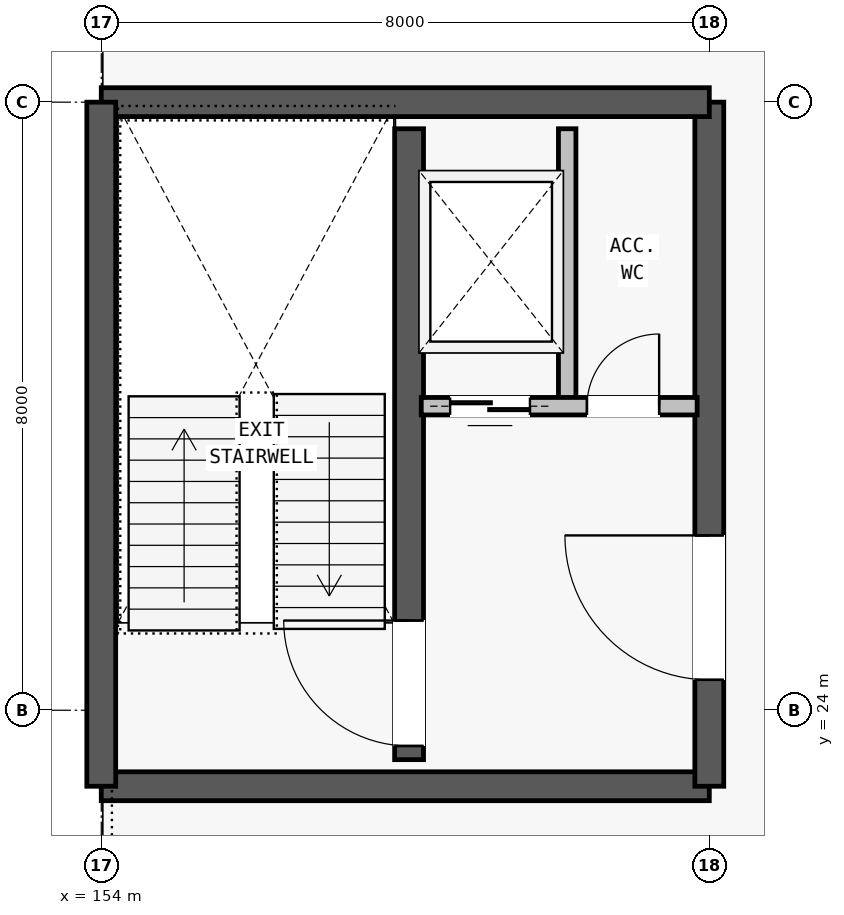
"""IFC4 building model, lengths in metres.
Left out: names, types, materials, properties, quantities, classifications, styles, units other than length and angle.
Written with IfcOpenShell. Run it as: python <this file> out.ifc"""

import sys

from ifc_helpers import new_model, si_unit, direction, frame, frame_2d, origin, place, context, subcontext, project, spatial, rectangle, extrude, element, fill, save


model = new_model("IFC4")
c1 = context("Model", 3, precision=1e-05, world=origin(), true_north=direction((0.0, 1.0)))
c2 = subcontext(c1, "Body", "Model", "MODEL_VIEW")
j1 = project(units=[si_unit("LENGTHUNIT", "METRE"), si_unit("PLANEANGLEUNIT", "RADIAN")], contexts=[c1])
p1 = place(None, origin())
s1 = spatial("IfcSite", under=j1, at=p1, CompositionType="ELEMENT")
p2 = place(p1, origin())
s2 = spatial("IfcBuilding", under=s1, at=p2, CompositionType="ELEMENT")
p3 = place(p2, frame((0.0, 0.0, 9.5)))
s3 = spatial("IfcBuildingStorey", under=s2, at=p3, CompositionType="ELEMENT", Elevation=9.5)
p4 = place(p3, frame((154.0, 23.0, 0.0), z_axis=(0.0, 0.0, 1.0), x_axis=(1.0, 0.0, 0.0)))
e1 = element("IfcWall", 1, at=p4, inside=s3, PredefinedType="SHEAR", context=c2, shape_type="SweptSolid", body=[
    extrude(rectangle(XDim=8.0, YDim=0.38, at=frame_2d((4.0, 0.0))), origin(), (0.0, 0.0, 1.0), 3.62),
])
p5 = place(p3, frame((162.0, 23.0, 0.0), z_axis=(0.0, 0.0, 1.0), x_axis=(0.0, 1.0, 0.0)))
e2 = element("IfcWall", 2, at=p5, inside=s3, PredefinedType="SHEAR", context=c2, shape_type="SweptSolid", body=[
    extrude(rectangle(XDim=9.0, YDim=0.38, at=frame_2d((4.5, 0.0))), origin(), (0.0, 0.0, 1.0), 3.62),
])
p6 = place(p5, frame((1.4, 0.0, 0.0)))
e3 = element("IfcOpeningElement", 3, at=p6, cuts=e2, PredefinedType="OPENING", context=c2, shape_type="SweptSolid", body=[
    extrude(rectangle(XDim=1.9, YDim=2.3, at=frame_2d((0.95, 1.15))), frame((0.0, 0.2, 0.0), z_axis=(0.0, -1.0, 0.0), x_axis=(1.0, 0.0, 0.0)), (0.0, 0.0, 1.0), 0.4),
])
p7 = place(p3, frame((162.0, 32.0, 0.0), z_axis=(0.0, 0.0, 1.0), x_axis=(-1.0, 0.0, 0.0)))
e4 = element("IfcWall", 4, at=p7, inside=s3, PredefinedType="SHEAR", context=c2, shape_type="SweptSolid", body=[
    extrude(rectangle(XDim=8.0, YDim=0.38, at=frame_2d((4.0, 0.0))), origin(), (0.0, 0.0, 1.0), 3.62),
])
p8 = place(p3, frame((154.0, 32.0, 0.0), z_axis=(0.0, 0.0, 1.0), x_axis=(0.0, -1.0, 0.0)))
e5 = element("IfcWall", 5, at=p8, inside=s3, PredefinedType="SHEAR", context=c2, shape_type="SweptSolid", body=[
    extrude(rectangle(XDim=9.0, YDim=0.38, at=frame_2d((4.5, 0.0))), origin(), (0.0, 0.0, 1.0), 3.62),
])
p9 = place(p3, frame((158.05, 23.35, 0.0), z_axis=(0.0, 0.0, 1.0), x_axis=(0.0, 1.0, 0.0)))
e6 = element("IfcWall", 6, at=p9, inside=s3, PredefinedType="SHEAR", context=c2, shape_type="SweptSolid", body=[
    extrude(rectangle(XDim=8.3, YDim=0.38, at=frame_2d((4.15, 0.0))), origin(), (0.0, 0.0, 1.0), 3.62),
])
p10 = place(p9, frame((0.18, 0.0, 0.0)))
e7 = element("IfcOpeningElement", 7, at=p10, cuts=e6, PredefinedType="OPENING", context=c2, shape_type="SweptSolid", body=[
    extrude(rectangle(XDim=1.65, YDim=2.2, at=frame_2d((0.825, 1.1))), frame((0.0, 0.2, 0.0), z_axis=(0.0, -1.0, 0.0), x_axis=(1.0, 0.0, 0.0)), (0.0, 0.0, 1.0), 0.4),
])
p11 = place(p3, frame((160.13, 28.0, 0.0), z_axis=(0.0, 0.0, 1.0), x_axis=(0.0, 1.0, 0.0)))
e8 = element("IfcWall", 8, at=p11, inside=s3, PredefinedType="PARTITIONING", context=c2, shape_type="SweptSolid", body=[
    extrude(rectangle(XDim=3.65, YDim=0.23, at=frame_2d((1.825, 0.0))), origin(), (0.0, 0.0, 1.0), 2.48),
])
p12 = place(p3, frame((158.21, 28.0, 0.0), z_axis=(0.0, 0.0, 1.0), x_axis=(1.0, 0.0, 0.0)))
e9 = element("IfcWall", 9, at=p12, inside=s3, PredefinedType="PARTITIONING", context=c2, shape_type="SweptSolid", body=[
    extrude(rectangle(XDim=3.63, YDim=0.23, at=frame_2d((1.815, 0.0))), origin(), (0.0, 0.0, 1.0), 2.48),
])
p13 = place(p12, frame((0.38, 0.0, 0.0)))
e10 = element("IfcOpeningElement", 10, at=p13, cuts=e9, PredefinedType="OPENING", context=c2, shape_type="SweptSolid", body=[
    extrude(rectangle(XDim=1.05, YDim=2.15, at=frame_2d((0.525, 1.075))), frame((0.0, 0.125, 0.0), z_axis=(0.0, -1.0, 0.0), x_axis=(1.0, 0.0, 0.0)), (0.0, 0.0, 1.0), 0.25),
])
p14 = place(p12, frame((2.18, 0.0, 0.0)))
e11 = element("IfcOpeningElement", 11, at=p14, cuts=e9, PredefinedType="OPENING", context=c2, shape_type="SweptSolid", body=[
    extrude(rectangle(XDim=0.95, YDim=2.1, at=frame_2d((0.475, 1.05))), frame((0.0, 0.125, 0.0), z_axis=(0.0, -1.0, 0.0), x_axis=(1.0, 0.0, 0.0)), (0.0, 0.0, 1.0), 0.25),
])
p15 = place(p6, origin())
e12 = element("IfcDoor", 12, at=p15, inside=s3, OperationType="SINGLE_SWING_RIGHT", PredefinedType="DOOR", context=c2, shape_type="SweptSolid", body=[
    extrude(rectangle(XDim=1.9, YDim=2.3, at=frame_2d((0.95, 1.15))), frame((0.0, 0.025, 0.0), z_axis=(0.0, -1.0, 0.0), x_axis=(1.0, 0.0, 0.0)), (0.0, 0.0, 1.0), 0.05),
])
fill(e3, e12)
p16 = place(p10, origin())
e13 = element("IfcDoor", 13, at=p16, inside=s3, OperationType="SINGLE_SWING_RIGHT", PredefinedType="DOOR", context=c2, shape_type="SweptSolid", body=[
    extrude(rectangle(XDim=1.65, YDim=2.2, at=frame_2d((0.825, 1.1))), frame((0.0, 0.025, 0.0), z_axis=(0.0, -1.0, 0.0), x_axis=(1.0, 0.0, 0.0)), (0.0, 0.0, 1.0), 0.05),
])
fill(e7, e13)
p17 = place(p13, origin())
e14 = element("IfcDoor", 14, at=p17, inside=s3, OperationType="SLIDING_TO_LEFT", PredefinedType="DOOR", context=c2, shape_type="SweptSolid", body=[
    extrude(rectangle(XDim=1.05, YDim=2.15, at=frame_2d((0.525, 1.075))), frame((0.0, 0.025, 0.0), z_axis=(0.0, -1.0, 0.0), x_axis=(1.0, 0.0, 0.0)), (0.0, 0.0, 1.0), 0.05),
])
fill(e10, e14)
p18 = place(p14, origin())
e15 = element("IfcDoor", 15, at=p18, inside=s3, OperationType="SINGLE_SWING_RIGHT", PredefinedType="DOOR", context=c2, shape_type="SweptSolid", body=[
    extrude(rectangle(XDim=0.95, YDim=2.1, at=frame_2d((0.475, 1.05))), frame((0.0, 0.025, 0.0), z_axis=(0.0, -1.0, 0.0), x_axis=(1.0, 0.0, 0.0)), (0.0, 0.0, 1.0), 0.05),
])
fill(e11, e15)
save(model, sys.argv[1])
